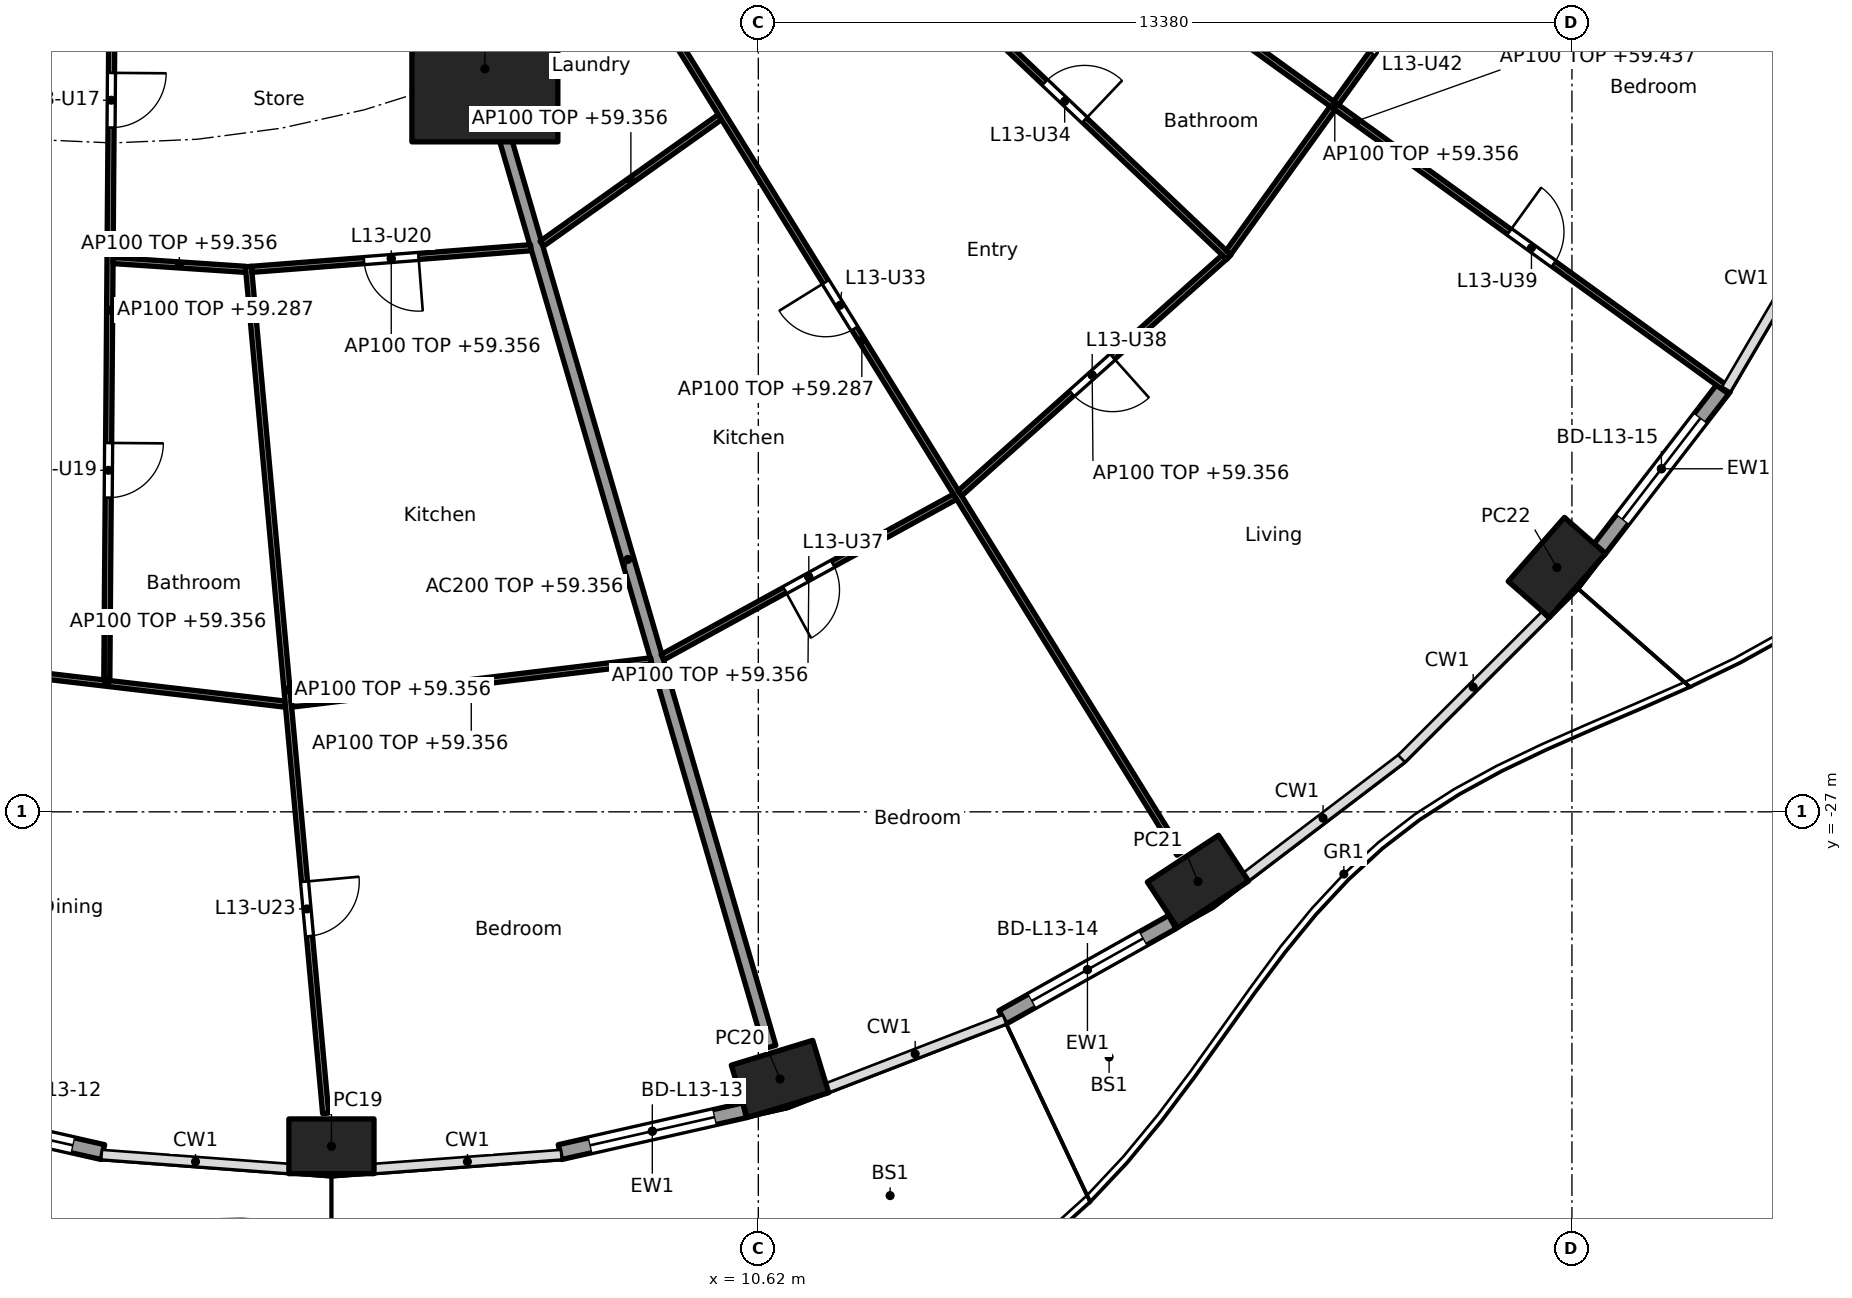
"""IFC4 building model, lengths in metres.
Left out: names, types, materials, properties, quantities, classifications, styles, units other than length and angle.
Written with IfcOpenShell. Run it as: python <this file> out.ifc"""

import sys

from ifc_helpers import new_model, si_unit, direction, frame, frame_2d, origin, origin_2d, place, context, subcontext, project, spatial, rectangle, hollow_rectangle, extrude, element, fill, save


model = new_model("IFC4")
c1 = context("Model", 3, precision=1e-05, world=origin(), true_north=direction((0.0, 1.0)))
c2 = subcontext(c1, "Body", "Model", "MODEL_VIEW")
j1 = project(units=[si_unit("LENGTHUNIT", "METRE"), si_unit("PLANEANGLEUNIT", "RADIAN")], contexts=[c1])
p1 = place(None, origin())
s1 = spatial("IfcSite", under=j1, at=p1, CompositionType="ELEMENT")
p2 = place(p1, origin())
s2 = spatial("IfcBuilding", under=s1, at=p2, CompositionType="ELEMENT")
p3 = place(p2, frame((0.0, 0.0, 56.6)))
s3 = spatial("IfcBuildingStorey", under=s2, at=p3, CompositionType="ELEMENT", Elevation=56.6)
for number, where, z_axis, x_axis in (
    (1, (3.6, -32.5, 0.0), (0.0, 0.0, 1.0), (1.0, 0.0, 0.0)),
    (2, (10.976, -31.393, 0.0), (0.0, 0.0, 1.0), (0.957, 0.292, 0.0)),
    (3, (17.85, -28.146, 0.0), (0.0, 0.0, 1.0), (0.836, 0.549, 0.0)),
    (4, (23.752, -22.981, 0.0), (0.0, 0.0, 1.0), (0.66, 0.751, 0.0)),
):
    element("IfcColumn", number, at=place(p3, frame(where, z_axis=z_axis, x_axis=x_axis)), inside=s3, PredefinedType="COLUMN", context=c2, shape_type="SweptSolid", body=[
        extrude(hollow_rectangle(XDim=1.4, YDim=0.9, WallThickness=0.05, at=origin_2d()), origin(), (0.0, 0.0, 1.0), 3.7),
    ])
p4 = place(p3, frame((6.123, -14.782, 0.0), z_axis=(0.0, 0.0, 1.0), x_axis=(1.0, 0.0, 0.0)))
e5 = element("IfcColumn", 5, at=p4, inside=s3, PredefinedType="COLUMN", context=c2, shape_type="SweptSolid", body=[
    extrude(rectangle(XDim=2.4, YDim=2.4, at=origin_2d()), origin(), (0.0, 0.0, 1.0), 3.7),
])
p5 = place(p3, frame((-0.158, -32.596, 0.0), z_axis=(0.0, 0.0, 1.0), x_axis=(-0.975331134677, 0.220746863466, 0.0)))
e6 = element("IfcWall", 6, at=p5, inside=s3, PredefinedType="SOLIDWALL", context=c2, shape_type="SweptSolid", body=[
    extrude(rectangle(XDim=3.115, YDim=0.25, at=frame_2d((1.557, 0.0))), origin(), (0.0, 0.0, 1.0), 3.44),
])
p6 = place(p5, frame((0.507, 0.0, 0.0)))
e7 = element("IfcOpeningElement", 7, at=p6, cuts=e6, PredefinedType="OPENING", context=c2, shape_type="SweptSolid", body=[
    extrude(rectangle(XDim=2.1, YDim=2.4, at=frame_2d((1.05, 1.2))), frame((0.0, 0.135, 0.0), z_axis=(0.0, -1.0, 0.0), x_axis=(1.0, 0.0, 0.0)), (0.0, 0.0, 1.0), 0.27),
])
p7 = place(p3, frame((10.396, -31.908, 0.0), z_axis=(0.0, 0.0, 1.0), x_axis=(-0.97533495413, -0.220729987208, 0.0)))
e8 = element("IfcWall", 8, at=p7, inside=s3, PredefinedType="SOLIDWALL", context=c2, shape_type="SweptSolid", body=[
    extrude(rectangle(XDim=3.115, YDim=0.25, at=frame_2d((1.557, 0.0))), origin(), (0.0, 0.0, 1.0), 3.44),
])
p8 = place(p7, frame((0.507, 0.0, 0.0)))
e9 = element("IfcOpeningElement", 9, at=p8, cuts=e8, PredefinedType="OPENING", context=c2, shape_type="SweptSolid", body=[
    extrude(rectangle(XDim=2.1, YDim=2.4, at=frame_2d((1.05, 1.2))), frame((0.0, 0.135, 0.0), z_axis=(0.0, -1.0, 0.0), x_axis=(1.0, 0.0, 0.0)), (0.0, 0.0, 1.0), 0.27),
])
p9 = place(p3, frame((17.428, -28.812, 0.0), z_axis=(0.0, 0.0, 1.0), x_axis=(-0.872102558443, -0.489323132048, 0.0)))
e10 = element("IfcWall", 10, at=p9, inside=s3, PredefinedType="SOLIDWALL", context=c2, shape_type="SweptSolid", body=[
    extrude(rectangle(XDim=3.201, YDim=0.25, at=frame_2d((1.601, 0.0))), origin(), (0.0, 0.0, 1.0), 3.44),
])
p10 = place(p9, frame((0.551, 0.0, 0.0)))
e11 = element("IfcOpeningElement", 11, at=p10, cuts=e10, PredefinedType="OPENING", context=c2, shape_type="SweptSolid", body=[
    extrude(rectangle(XDim=2.1, YDim=2.4, at=frame_2d((1.05, 1.2))), frame((0.0, 0.135, 0.0), z_axis=(0.0, -1.0, 0.0), x_axis=(1.0, 0.0, 0.0)), (0.0, 0.0, 1.0), 0.27),
])
p11 = place(p3, frame((26.508, -20.013, 0.0), z_axis=(0.0, 0.0, 1.0), x_axis=(-0.610457147657, -0.792049285635, 0.0)))
e12 = element("IfcWall", 12, at=p11, inside=s3, PredefinedType="SOLIDWALL", context=c2, shape_type="SweptSolid", body=[
    extrude(rectangle(XDim=3.397, YDim=0.25, at=frame_2d((1.699, 0.0))), origin(), (0.0, 0.0, 1.0), 3.44),
])
p12 = place(p11, frame((0.649, 0.0, 0.0)))
e13 = element("IfcOpeningElement", 13, at=p12, cuts=e12, PredefinedType="OPENING", context=c2, shape_type="SweptSolid", body=[
    extrude(rectangle(XDim=2.1, YDim=2.4, at=frame_2d((1.05, 1.2))), frame((0.0, 0.135, 0.0), z_axis=(0.0, -1.0, 0.0), x_axis=(1.0, 0.0, 0.0)), (0.0, 0.0, 1.0), 0.27),
])
p13 = place(p3, frame((5.243, -12.657, 0.0), z_axis=(0.0, 0.0, 1.0), x_axis=(0.382707856524, -0.923869415315, 0.0)))
e14 = element("IfcWall", 14, at=p13, inside=s3, PredefinedType="PARTITIONING", context=c2, shape_type="SweptSolid", body=[
    extrude(rectangle(XDim=2.2, YDim=0.2, at=frame_2d((1.1, 0.0))), origin(), (0.0, 0.0, 1.0), 3.44),
])
p14 = place(p3, frame((6.137, -14.83, 0.0), z_axis=(0.0, 0.0, 1.0), x_axis=(0.27985745069, -0.960041565399, 0.0)))
e15 = element("IfcWall", 15, at=p14, inside=s3, PredefinedType="PARTITIONING", context=c2, shape_type="SweptSolid", body=[
    extrude(rectangle(XDim=16.705, YDim=0.2, at=frame_2d((8.353, 0.0))), origin(), (0.0, 0.0, 1.0), 2.756),
])
p15 = place(p3, frame((-3.031, -24.543, 0.0), z_axis=(0.0, 0.0, 1.0), x_axis=(0.993255612046, -0.115945198862, 0.0)))
e16 = element("IfcWall", 16, at=p15, inside=s3, PredefinedType="PARTITIONING", context=c2, shape_type="SweptSolid", body=[
    extrude(rectangle(XDim=5.913, YDim=0.1, at=frame_2d((2.956, 0.0))), origin(), (0.0, 0.0, 1.0), 2.756),
])
p16 = place(p3, frame((-0.001, -12.665, 0.0), z_axis=(0.0, 0.0, 1.0), x_axis=(-0.007702417287, -0.999970335944, 0.0)))
e17 = element("IfcWall", 17, at=p16, inside=s3, PredefinedType="PARTITIONING", context=c2, shape_type="SweptSolid", body=[
    extrude(rectangle(XDim=12.171, YDim=0.1, at=frame_2d((6.086, 0.0))), origin(), (0.0, 0.0, 1.0), 2.687),
])
p17 = place(p16, frame((2.183, 0.0, 0.0)))
e18 = element("IfcOpeningElement", 18, at=p17, cuts=e17, PredefinedType="OPENING", context=c2, shape_type="SweptSolid", body=[
    extrude(rectangle(XDim=0.9, YDim=2.1, at=frame_2d((0.45, 1.05))), frame((0.0, 0.06, 0.0), z_axis=(0.0, -1.0, 0.0), x_axis=(1.0, 0.0, 0.0)), (0.0, 0.0, 1.0), 0.12),
])
p18 = place(p16, frame((8.269, 0.0, 0.0)))
e19 = element("IfcOpeningElement", 19, at=p18, cuts=e17, PredefinedType="OPENING", context=c2, shape_type="SweptSolid", body=[
    extrude(rectangle(XDim=0.9, YDim=2.1, at=frame_2d((0.45, 1.05))), frame((0.0, 0.06, 0.0), z_axis=(0.0, -1.0, 0.0), x_axis=(1.0, 0.0, 0.0)), (0.0, 0.0, 1.0), 0.12),
])
p19 = place(p3, frame((0.009, -17.934, 0.0), z_axis=(0.0, 0.0, 1.0), x_axis=(0.997794542617, -0.066378089183, 0.0)))
e20 = element("IfcWall", 20, at=p19, inside=s3, PredefinedType="PARTITIONING", context=c2, shape_type="SweptSolid", body=[
    extrude(rectangle(XDim=2.185, YDim=0.1, at=frame_2d((1.092, 0.0))), origin(), (0.0, 0.0, 1.0), 2.756),
])
p20 = place(p3, frame((2.234, -18.032, 0.0), z_axis=(0.0, 0.0, 1.0), x_axis=(0.090891502968, -0.995860800859, 0.0)))
e21 = element("IfcWall", 21, at=p20, inside=s3, PredefinedType="PARTITIONING", context=c2, shape_type="SweptSolid", body=[
    extrude(rectangle(XDim=13.984, YDim=0.1, at=frame_2d((6.992, 0.0))), origin(), (0.0, 0.0, 1.0), 2.756),
])
p21 = place(p20, frame((10.158, 0.0, 0.0)))
e22 = element("IfcOpeningElement", 22, at=p21, cuts=e21, PredefinedType="OPENING", context=c2, shape_type="SweptSolid", body=[
    extrude(rectangle(XDim=0.9, YDim=2.1, at=frame_2d((0.45, 1.05))), frame((0.0, 0.06, 0.0), z_axis=(0.0, -1.0, 0.0), x_axis=(1.0, 0.0, 0.0)), (0.0, 0.0, 1.0), 0.12),
])
p22 = place(p3, frame((2.288, -18.078, 0.0), z_axis=(0.0, 0.0, 1.0), x_axis=(0.99701850123, 0.077162868047, 0.0)))
e23 = element("IfcWall", 23, at=p22, inside=s3, PredefinedType="PARTITIONING", context=c2, shape_type="SweptSolid", body=[
    extrude(rectangle(XDim=4.604, YDim=0.1, at=frame_2d((2.302, 0.0))), origin(), (0.0, 0.0, 1.0), 2.756),
])
p23 = place(p22, frame((1.852, 0.0, 0.0)))
e24 = element("IfcOpeningElement", 24, at=p23, cuts=e23, PredefinedType="OPENING", context=c2, shape_type="SweptSolid", body=[
    extrude(rectangle(XDim=0.9, YDim=2.1, at=frame_2d((0.45, 1.05))), frame((0.0, 0.06, 0.0), z_axis=(0.0, -1.0, 0.0), x_axis=(1.0, 0.0, 0.0)), (0.0, 0.0, 1.0), 0.12),
])
p24 = place(p3, frame((2.941, -25.229, 0.0), z_axis=(0.0, 0.0, 1.0), x_axis=(0.992834127896, 0.119500604542, 0.0)))
e25 = element("IfcWall", 25, at=p24, inside=s3, PredefinedType="PARTITIONING", context=c2, shape_type="SweptSolid", body=[
    extrude(rectangle(XDim=5.959, YDim=0.1, at=frame_2d((2.98, 0.0))), origin(), (0.0, 0.0, 1.0), 2.756),
])
p25 = place(p3, frame((7.06, -17.657, 0.0), z_axis=(0.0, 0.0, 1.0), x_axis=(0.81492039338, 0.57957290521, 0.0)))
e26 = element("IfcWall", 26, at=p25, inside=s3, PredefinedType="PARTITIONING", context=c2, shape_type="SweptSolid", body=[
    extrude(rectangle(XDim=3.594, YDim=0.1, at=frame_2d((1.797, 0.0))), origin(), (0.0, 0.0, 1.0), 2.756),
])
p26 = place(p3, frame((9.045, -24.456, 0.0), z_axis=(0.0, 0.0, 1.0), x_axis=(0.876809987787, 0.480837025734, 0.0)))
e27 = element("IfcWall", 27, at=p26, inside=s3, PredefinedType="PARTITIONING", context=c2, shape_type="SweptSolid", body=[
    extrude(rectangle(XDim=5.486, YDim=0.1, at=frame_2d((2.743, 0.0))), origin(), (0.0, 0.0, 1.0), 2.756),
])
p27 = place(p26, frame((2.293, 0.0, 0.0)))
e28 = element("IfcOpeningElement", 28, at=p27, cuts=e27, PredefinedType="OPENING", context=c2, shape_type="SweptSolid", body=[
    extrude(rectangle(XDim=0.9, YDim=2.1, at=frame_2d((0.45, 1.05))), frame((0.0, 0.06, 0.0), z_axis=(0.0, -1.0, 0.0), x_axis=(1.0, 0.0, 0.0)), (0.0, 0.0, 1.0), 0.12),
])
p28 = place(p3, frame((7.097, -10.81, 0.0), z_axis=(0.0, 0.0, 1.0), x_axis=(0.526453266471, -0.850204068576, 0.0)))
e29 = element("IfcWall", 29, at=p28, inside=s3, PredefinedType="PARTITIONING", context=c2, shape_type="SweptSolid", body=[
    extrude(rectangle(XDim=19.85, YDim=0.1, at=frame_2d((9.925, 0.0))), origin(), (0.0, 0.0, 1.0), 2.687),
])
p29 = place(p28, frame((0.35, 0.0, 0.0)))
e30 = element("IfcOpeningElement", 30, at=p29, cuts=e29, PredefinedType="OPENING", context=c2, shape_type="SweptSolid", body=[
    extrude(rectangle(XDim=0.9, YDim=2.1, at=frame_2d((0.45, 1.05))), frame((0.0, 0.06, 0.0), z_axis=(0.0, -1.0, 0.0), x_axis=(1.0, 0.0, 0.0)), (0.0, 0.0, 1.0), 0.12),
])
p30 = place(p28, frame((8.795, 0.0, 0.0)))
e31 = element("IfcOpeningElement", 31, at=p30, cuts=e29, PredefinedType="OPENING", context=c2, shape_type="SweptSolid", body=[
    extrude(rectangle(XDim=0.9, YDim=2.1, at=frame_2d((0.45, 1.05))), frame((0.0, 0.06, 0.0), z_axis=(0.0, -1.0, 0.0), x_axis=(1.0, 0.0, 0.0)), (0.0, 0.0, 1.0), 0.12),
])
p31 = place(p3, frame((13.936, -21.761, 0.0), z_axis=(0.0, 0.0, 1.0), x_axis=(0.745806142791, 0.666163041136, 0.0)))
e32 = element("IfcWall", 32, at=p31, inside=s3, PredefinedType="PARTITIONING", context=c2, shape_type="SweptSolid", body=[
    extrude(rectangle(XDim=5.831, YDim=0.1, at=frame_2d((2.915, 0.0))), origin(), (0.0, 0.0, 1.0), 2.756),
])
p32 = place(p31, frame((2.465, 0.0, 0.0)))
e33 = element("IfcOpeningElement", 33, at=p32, cuts=e32, PredefinedType="OPENING", context=c2, shape_type="SweptSolid", body=[
    extrude(rectangle(XDim=0.9, YDim=2.1, at=frame_2d((0.45, 1.05))), frame((0.0, 0.06, 0.0), z_axis=(0.0, -1.0, 0.0), x_axis=(1.0, 0.0, 0.0)), (0.0, 0.0, 1.0), 0.12),
])
p33 = place(p3, frame((8.957, -8.953, 0.0), z_axis=(0.0, 0.0, 1.0), x_axis=(0.725250022034, -0.688485588476, 0.0)))
e34 = element("IfcWall", 34, at=p33, inside=s3, PredefinedType="PARTITIONING", context=c2, shape_type="SweptSolid", body=[
    extrude(rectangle(XDim=12.963, YDim=0.1, at=frame_2d((6.481, 0.0))), origin(), (0.0, 0.0, 1.0), 2.687),
])
p34 = place(p33, frame((2.333, 0.0, 0.0)))
e35 = element("IfcOpeningElement", 35, at=p34, cuts=e34, PredefinedType="OPENING", context=c2, shape_type="SweptSolid", body=[
    extrude(rectangle(XDim=0.9, YDim=2.1, at=frame_2d((0.45, 1.05))), frame((0.0, 0.06, 0.0), z_axis=(0.0, -1.0, 0.0), x_axis=(1.0, 0.0, 0.0)), (0.0, 0.0, 1.0), 0.12),
])
p35 = place(p33, frame((8.79, 0.0, 0.0)))
e36 = element("IfcOpeningElement", 36, at=p35, cuts=e34, PredefinedType="OPENING", context=c2, shape_type="SweptSolid", body=[
    extrude(rectangle(XDim=0.9, YDim=2.1, at=frame_2d((0.45, 1.05))), frame((0.0, 0.06, 0.0), z_axis=(0.0, -1.0, 0.0), x_axis=(1.0, 0.0, 0.0)), (0.0, 0.0, 1.0), 0.12),
])
p36 = place(p3, frame((18.351, -17.803, 0.0), z_axis=(0.0, 0.0, 1.0), x_axis=(0.584563700282, 0.811347817099, 0.0)))
e37 = element("IfcWall", 37, at=p36, inside=s3, PredefinedType="PARTITIONING", context=c2, shape_type="SweptSolid", body=[
    extrude(rectangle(XDim=5.984, YDim=0.1, at=frame_2d((2.992, 0.0))), origin(), (0.0, 0.0, 1.0), 2.756),
])
p37 = place(p36, frame((4.038, 0.0, 0.0)))
e38 = element("IfcOpeningElement", 38, at=p37, cuts=e37, PredefinedType="OPENING", context=c2, shape_type="SweptSolid", body=[
    extrude(rectangle(XDim=0.9, YDim=2.1, at=frame_2d((0.45, 1.05))), frame((0.0, 0.06, 0.0), z_axis=(0.0, -1.0, 0.0), x_axis=(1.0, 0.0, 0.0)), (0.0, 0.0, 1.0), 0.12),
])
p38 = place(p3, frame((14.329, -11.221, 0.0), z_axis=(0.0, 0.0, 1.0), x_axis=(0.810671130917, -0.58550176558, 0.0)))
e39 = element("IfcWall", 39, at=p38, inside=s3, PredefinedType="PARTITIONING", context=c2, shape_type="SweptSolid", body=[
    extrude(rectangle(XDim=15.106, YDim=0.1, at=frame_2d((7.553, 0.0))), origin(), (0.0, 0.0, 1.0), 2.837),
])
p39 = place(p38, frame((10.659, 0.0, 0.0)))
e40 = element("IfcOpeningElement", 40, at=p39, cuts=e39, PredefinedType="OPENING", context=c2, shape_type="SweptSolid", body=[
    extrude(rectangle(XDim=0.9, YDim=2.1, at=frame_2d((0.45, 1.05))), frame((0.0, 0.06, 0.0), z_axis=(0.0, -1.0, 0.0), x_axis=(1.0, 0.0, 0.0)), (0.0, 0.0, 1.0), 0.12),
])
p40 = place(p6, origin())
e41 = element("IfcDoor", 41, at=p40, inside=s3, OperationType="SLIDING_TO_LEFT", PredefinedType="DOOR", context=c2, shape_type="SweptSolid", body=[
    extrude(rectangle(XDim=2.1, YDim=2.4, at=frame_2d((1.05, 1.2))), frame((0.0, 0.025, 0.0), z_axis=(0.0, -1.0, 0.0), x_axis=(1.0, 0.0, 0.0)), (0.0, 0.0, 1.0), 0.05),
])
fill(e7, e41)
p41 = place(p8, origin())
e42 = element("IfcDoor", 42, at=p41, inside=s3, OperationType="SLIDING_TO_LEFT", PredefinedType="DOOR", context=c2, shape_type="SweptSolid", body=[
    extrude(rectangle(XDim=2.1, YDim=2.4, at=frame_2d((1.05, 1.2))), frame((0.0, 0.025, 0.0), z_axis=(0.0, -1.0, 0.0), x_axis=(1.0, 0.0, 0.0)), (0.0, 0.0, 1.0), 0.05),
])
fill(e9, e42)
p42 = place(p10, origin())
e43 = element("IfcDoor", 43, at=p42, inside=s3, OperationType="SLIDING_TO_LEFT", PredefinedType="DOOR", context=c2, shape_type="SweptSolid", body=[
    extrude(rectangle(XDim=2.1, YDim=2.4, at=frame_2d((1.05, 1.2))), frame((0.0, 0.025, 0.0), z_axis=(0.0, -1.0, 0.0), x_axis=(1.0, 0.0, 0.0)), (0.0, 0.0, 1.0), 0.05),
])
fill(e11, e43)
p43 = place(p12, origin())
e44 = element("IfcDoor", 44, at=p43, inside=s3, OperationType="SLIDING_TO_LEFT", PredefinedType="DOOR", context=c2, shape_type="SweptSolid", body=[
    extrude(rectangle(XDim=2.1, YDim=2.4, at=frame_2d((1.05, 1.2))), frame((0.0, 0.025, 0.0), z_axis=(0.0, -1.0, 0.0), x_axis=(1.0, 0.0, 0.0)), (0.0, 0.0, 1.0), 0.05),
])
fill(e13, e44)
p44 = place(p17, origin())
e45 = element("IfcDoor", 45, at=p44, inside=s3, OperationType="SINGLE_SWING_LEFT", PredefinedType="DOOR", context=c2, shape_type="SweptSolid", body=[
    extrude(rectangle(XDim=0.9, YDim=2.1, at=frame_2d((0.45, 1.05))), frame((0.0, 0.025, 0.0), z_axis=(0.0, -1.0, 0.0), x_axis=(1.0, 0.0, 0.0)), (0.0, 0.0, 1.0), 0.05),
])
fill(e18, e45)
p45 = place(p18, origin())
e46 = element("IfcDoor", 46, at=p45, inside=s3, OperationType="SINGLE_SWING_LEFT", PredefinedType="DOOR", context=c2, shape_type="SweptSolid", body=[
    extrude(rectangle(XDim=0.9, YDim=2.1, at=frame_2d((0.45, 1.05))), frame((0.0, 0.025, 0.0), z_axis=(0.0, -1.0, 0.0), x_axis=(1.0, 0.0, 0.0)), (0.0, 0.0, 1.0), 0.05),
])
fill(e19, e46)
p46 = place(p23, frame((0.9, 0.0, 0.0), x_axis=(-1.0, 0.0, 0.0)))
e47 = element("IfcDoor", 47, at=p46, inside=s3, OperationType="SINGLE_SWING_LEFT", PredefinedType="DOOR", context=c2, shape_type="SweptSolid", body=[
    extrude(rectangle(XDim=0.9, YDim=2.1, at=frame_2d((0.45, 1.05))), frame((0.0, 0.025, 0.0), z_axis=(0.0, -1.0, 0.0), x_axis=(1.0, 0.0, 0.0)), (0.0, 0.0, 1.0), 0.05),
])
fill(e24, e47)
p47 = place(p21, origin())
e48 = element("IfcDoor", 48, at=p47, inside=s3, OperationType="SINGLE_SWING_LEFT", PredefinedType="DOOR", context=c2, shape_type="SweptSolid", body=[
    extrude(rectangle(XDim=0.9, YDim=2.1, at=frame_2d((0.45, 1.05))), frame((0.0, 0.025, 0.0), z_axis=(0.0, -1.0, 0.0), x_axis=(1.0, 0.0, 0.0)), (0.0, 0.0, 1.0), 0.05),
])
fill(e22, e48)
p48 = place(p30, frame((0.9, 0.0, 0.0), x_axis=(-1.0, 0.0, 0.0)))
e49 = element("IfcDoor", 49, at=p48, inside=s3, OperationType="SINGLE_SWING_RIGHT", PredefinedType="DOOR", context=c2, shape_type="SweptSolid", body=[
    extrude(rectangle(XDim=0.9, YDim=2.1, at=frame_2d((0.45, 1.05))), frame((0.0, 0.025, 0.0), z_axis=(0.0, -1.0, 0.0), x_axis=(1.0, 0.0, 0.0)), (0.0, 0.0, 1.0), 0.05),
])
fill(e31, e49)
p49 = place(p35, origin())
e50 = element("IfcDoor", 50, at=p49, inside=s3, OperationType="SINGLE_SWING_RIGHT", PredefinedType="DOOR", context=c2, shape_type="SweptSolid", body=[
    extrude(rectangle(XDim=0.9, YDim=2.1, at=frame_2d((0.45, 1.05))), frame((0.0, 0.025, 0.0), z_axis=(0.0, -1.0, 0.0), x_axis=(1.0, 0.0, 0.0)), (0.0, 0.0, 1.0), 0.05),
])
fill(e36, e50)
p50 = place(p27, frame((0.9, 0.0, 0.0), x_axis=(-1.0, 0.0, 0.0)))
e51 = element("IfcDoor", 51, at=p50, inside=s3, OperationType="SINGLE_SWING_RIGHT", PredefinedType="DOOR", context=c2, shape_type="SweptSolid", body=[
    extrude(rectangle(XDim=0.9, YDim=2.1, at=frame_2d((0.45, 1.05))), frame((0.0, 0.025, 0.0), z_axis=(0.0, -1.0, 0.0), x_axis=(1.0, 0.0, 0.0)), (0.0, 0.0, 1.0), 0.05),
])
fill(e28, e51)
p51 = place(p32, frame((0.9, 0.0, 0.0), x_axis=(-1.0, 0.0, 0.0)))
e52 = element("IfcDoor", 52, at=p51, inside=s3, OperationType="SINGLE_SWING_LEFT", PredefinedType="DOOR", context=c2, shape_type="SweptSolid", body=[
    extrude(rectangle(XDim=0.9, YDim=2.1, at=frame_2d((0.45, 1.05))), frame((0.0, 0.025, 0.0), z_axis=(0.0, -1.0, 0.0), x_axis=(1.0, 0.0, 0.0)), (0.0, 0.0, 1.0), 0.05),
])
fill(e33, e52)
p52 = place(p39, origin())
e53 = element("IfcDoor", 53, at=p52, inside=s3, OperationType="SINGLE_SWING_LEFT", PredefinedType="DOOR", context=c2, shape_type="SweptSolid", body=[
    extrude(rectangle(XDim=0.9, YDim=2.1, at=frame_2d((0.45, 1.05))), frame((0.0, 0.025, 0.0), z_axis=(0.0, -1.0, 0.0), x_axis=(1.0, 0.0, 0.0)), (0.0, 0.0, 1.0), 0.05),
])
fill(e40, e53)
p53 = place(p37, origin())
e54 = element("IfcDoor", 54, at=p53, inside=s3, OperationType="SINGLE_SWING_RIGHT", PredefinedType="DOOR", context=c2, shape_type="SweptSolid", body=[
    extrude(rectangle(XDim=0.9, YDim=2.1, at=frame_2d((0.45, 1.05))), frame((0.0, 0.025, 0.0), z_axis=(0.0, -1.0, 0.0), x_axis=(1.0, 0.0, 0.0)), (0.0, 0.0, 1.0), 0.05),
])
fill(e38, e54)
save(model, sys.argv[1])
